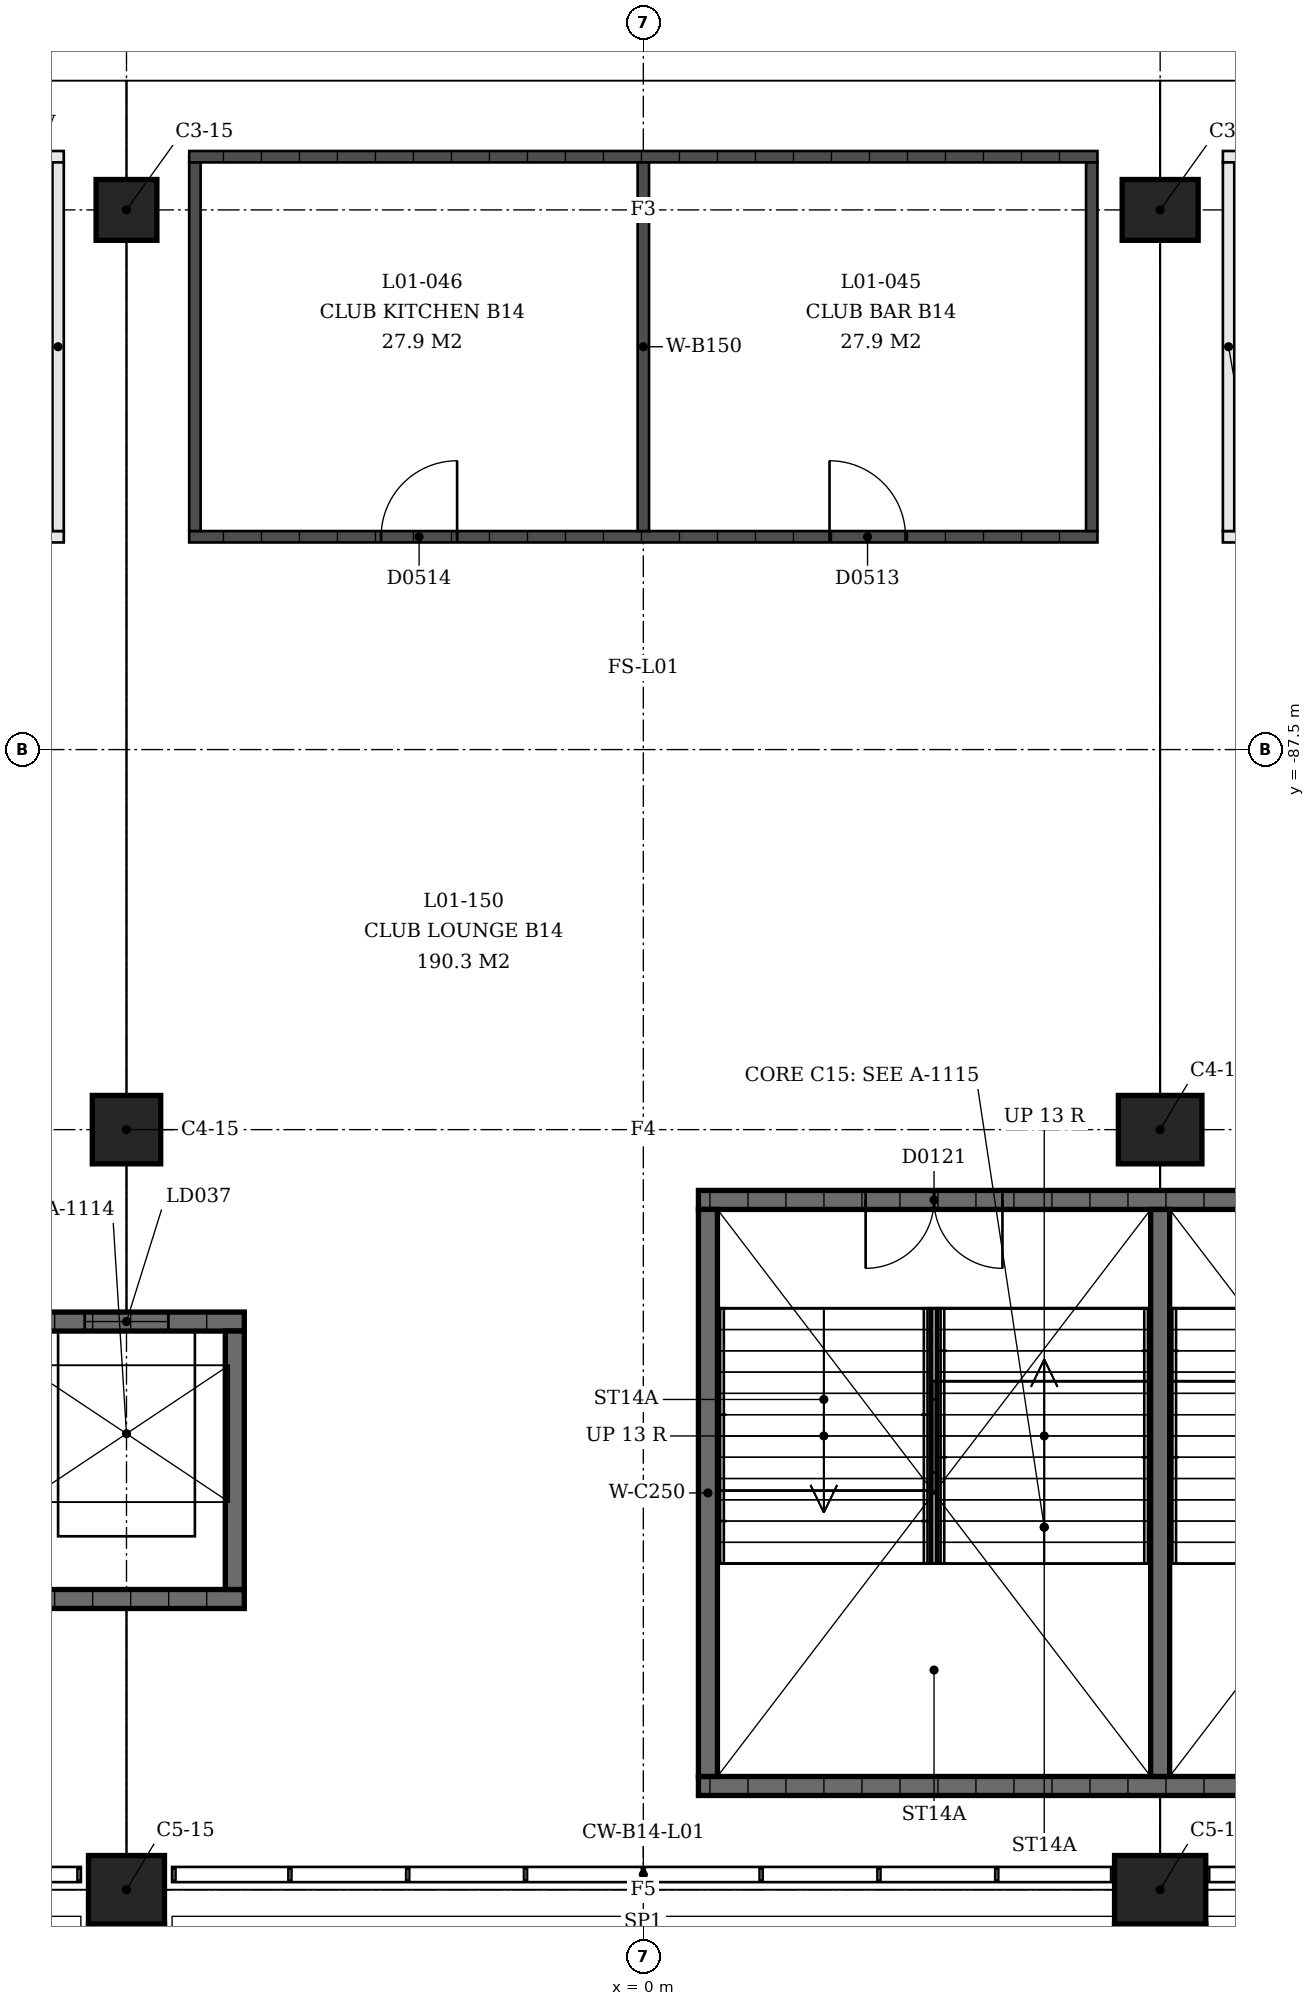
"""IFC4 building model, lengths in metres.
Left out: names, types, materials, properties, quantities, classifications, styles, units other than length and angle.
Written with IfcOpenShell. Run it as: python <this file> out.ifc"""

import sys

from ifc_helpers import new_model, si_unit, direction, frame, frame_2d, origin, origin_2d, place, context, subcontext, project, spatial, rectangle, extrude, element, fill, save


model = new_model("IFC4")
c1 = context("Model", 3, precision=1e-05, world=origin(), true_north=direction((0.0, 1.0)))
c2 = subcontext(c1, "Body", "Model", "MODEL_VIEW")
j1 = project(units=[si_unit("LENGTHUNIT", "METRE"), si_unit("PLANEANGLEUNIT", "RADIAN")], contexts=[c1])
p1 = place(None, origin())
s1 = spatial("IfcSite", under=j1, at=p1, CompositionType="ELEMENT")
p2 = place(p1, origin())
s2 = spatial("IfcBuilding", under=s1, at=p2, CompositionType="ELEMENT")
p3 = place(p2, frame((0.0, 0.0, 4.5)))
s3 = spatial("IfcBuildingStorey", under=s2, at=p3, CompositionType="ELEMENT", Elevation=4.5)
p4 = place(p3, frame((6.8, -80.4, 0.0), z_axis=(0.0, 0.0, 1.0), x_axis=(1.0, 0.0, 0.0)))
e1 = element("IfcColumn", 1, at=p4, inside=s3, PredefinedType="COLUMN", context=c2, shape_type="SweptSolid", body=[
    extrude(rectangle(XDim=1.0, YDim=0.8, at=origin_2d()), origin(), (0.0, 0.0, 1.0), 4.5),
])
p5 = place(p3, frame((6.8, -92.5, 0.0), z_axis=(0.0, 0.0, 1.0), x_axis=(1.0, 0.0, 0.0)))
e2 = element("IfcColumn", 2, at=p5, inside=s3, PredefinedType="COLUMN", context=c2, shape_type="SweptSolid", body=[
    extrude(rectangle(XDim=1.1, YDim=0.9, at=origin_2d()), origin(), (0.0, 0.0, 1.0), 4.5),
])
p6 = place(p3, frame((6.8, -102.5, 0.0), z_axis=(0.0, 0.0, 1.0), x_axis=(1.0, 0.0, 0.0)))
e3 = element("IfcColumn", 3, at=p6, inside=s3, PredefinedType="COLUMN", context=c2, shape_type="SweptSolid", body=[
    extrude(rectangle(XDim=1.2, YDim=0.9, at=origin_2d()), origin(), (0.0, 0.0, 1.0), 4.5),
])
p7 = place(p3, frame((-6.8, -80.4, 0.0), z_axis=(0.0, 0.0, 1.0), x_axis=(1.0, 0.0, 0.0)))
e4 = element("IfcColumn", 4, at=p7, inside=s3, PredefinedType="COLUMN", context=c2, shape_type="SweptSolid", body=[
    extrude(rectangle(XDim=0.8, YDim=0.8, at=origin_2d()), origin(), (0.0, 0.0, 1.0), 4.5),
])
p8 = place(p3, frame((-6.8, -92.5, 0.0), z_axis=(0.0, 0.0, 1.0), x_axis=(1.0, 0.0, 0.0)))
e5 = element("IfcColumn", 5, at=p8, inside=s3, PredefinedType="COLUMN", context=c2, shape_type="SweptSolid", body=[
    extrude(rectangle(XDim=0.9, YDim=0.9, at=origin_2d()), origin(), (0.0, 0.0, 1.0), 4.5),
])
p9 = place(p3, frame((-6.8, -102.5, 0.0), z_axis=(0.0, 0.0, 1.0), x_axis=(1.0, 0.0, 0.0)))
e6 = element("IfcColumn", 6, at=p9, inside=s3, PredefinedType="COLUMN", context=c2, shape_type="SweptSolid", body=[
    extrude(rectangle(XDim=1.0, YDim=0.9, at=origin_2d()), origin(), (0.0, 0.0, 1.0), 4.5),
])
p10 = place(p3, frame((0.725, -93.425, 0.0), z_axis=(0.0, 0.0, 1.0), x_axis=(1.0, 0.0, 0.0)))
e7 = element("IfcWall", 7, at=p10, inside=s3, PredefinedType="SHEAR", context=c2, shape_type="SweptSolid", body=[
    extrude(rectangle(XDim=12.15, YDim=0.25, at=frame_2d((6.075, 0.0))), origin(), (0.0, 0.0, 1.0), 4.09),
])
p11 = place(p10, frame((2.2, 0.0, 0.0)))
e8 = element("IfcOpeningElement", 8, at=p11, cuts=e7, PredefinedType="OPENING", context=c2, shape_type="SweptSolid", body=[
    extrude(rectangle(XDim=1.8, YDim=2.1, at=frame_2d((0.9, 1.05))), frame((0.0, 0.125, 0.0), z_axis=(0.0, -1.0, 0.0), x_axis=(1.0, 0.0, 0.0)), (0.0, 0.0, 1.0), 0.25),
])
p12 = place(p10, frame((8.15, 0.0, 0.0)))
e9 = element("IfcOpeningElement", 9, at=p12, cuts=e7, PredefinedType="OPENING", context=c2, shape_type="SweptSolid", body=[
    extrude(rectangle(XDim=1.8, YDim=2.1, at=frame_2d((0.9, 1.05))), frame((0.0, 0.125, 0.0), z_axis=(0.0, -1.0, 0.0), x_axis=(1.0, 0.0, 0.0)), (0.0, 0.0, 1.0), 0.25),
])
p13 = place(p3, frame((0.725, -101.135, 0.0), z_axis=(0.0, 0.0, 1.0), x_axis=(1.0, 0.0, 0.0)))
e10 = element("IfcWall", 10, at=p13, inside=s3, PredefinedType="SHEAR", context=c2, shape_type="SweptSolid", body=[
    extrude(rectangle(XDim=12.15, YDim=0.25, at=frame_2d((6.075, 0.0))), origin(), (0.0, 0.0, 1.0), 4.09),
])
for number, where, z_axis, x_axis in (
    (11, (0.85, -93.55, 0.0), (0.0, 0.0, 1.0), (0.0, -1.0, 0.0)),
    (12, (6.8, -93.55, 0.0), (0.0, 0.0, 1.0), (0.0, -1.0, 0.0)),
):
    element("IfcWall", number, at=place(p3, frame(where, z_axis=z_axis, x_axis=x_axis)), inside=s3, PredefinedType="SHEAR", context=c2, shape_type="SweptSolid", body=[
        extrude(rectangle(XDim=7.46, YDim=0.25, at=frame_2d((3.73, 0.0))), origin(), (0.0, 0.0, 1.0), 4.09),
    ])
p14 = place(p3, frame((-8.35, -95.025, 0.0), z_axis=(0.0, 0.0, 1.0), x_axis=(1.0, 0.0, 0.0)))
e13 = element("IfcWall", 13, at=p14, inside=s3, PredefinedType="SHEAR", context=c2, shape_type="SweptSolid", body=[
    extrude(rectangle(XDim=3.1, YDim=0.25, at=frame_2d((1.55, 0.0))), origin(), (0.0, 0.0, 1.0), 4.09),
])
p15 = place(p14, frame((1.0, 0.0, 0.0)))
e14 = element("IfcOpeningElement", 14, at=p15, cuts=e13, PredefinedType="OPENING", context=c2, shape_type="SweptSolid", body=[
    extrude(rectangle(XDim=1.1, YDim=2.1, at=frame_2d((0.55, 1.05))), frame((0.0, 0.125, 0.0), z_axis=(0.0, -1.0, 0.0), x_axis=(1.0, 0.0, 0.0)), (0.0, 0.0, 1.0), 0.25),
])
p16 = place(p3, frame((-8.35, -98.675, 0.0), z_axis=(0.0, 0.0, 1.0), x_axis=(1.0, 0.0, 0.0)))
e15 = element("IfcWall", 15, at=p16, inside=s3, PredefinedType="SHEAR", context=c2, shape_type="SweptSolid", body=[
    extrude(rectangle(XDim=3.1, YDim=0.25, at=frame_2d((1.55, 0.0))), origin(), (0.0, 0.0, 1.0), 4.09),
])
p17 = place(p3, frame((-5.375, -95.15, 0.0), z_axis=(0.0, 0.0, 1.0), x_axis=(0.0, -1.0, 0.0)))
e16 = element("IfcWall", 16, at=p17, inside=s3, PredefinedType="SHEAR", context=c2, shape_type="SweptSolid", body=[
    extrude(rectangle(XDim=3.4, YDim=0.25, at=frame_2d((1.7, 0.0))), origin(), (0.0, 0.0, 1.0), 4.09),
])
p18 = place(p3, frame((7.625, -79.7, 0.0), z_axis=(0.0, 0.0, 1.0), x_axis=(1.0, 0.0, 0.0)))
e17 = element("IfcWall", 17, at=p18, inside=s3, PredefinedType="PARTITIONING", context=c2, shape_type="SweptSolid", body=[
    extrude(rectangle(XDim=11.95, YDim=0.15, at=frame_2d((5.975, 0.0))), origin(), (0.0, 0.0, 1.0), 3.0),
])
p19 = place(p3, frame((7.625, -84.7, 0.0), z_axis=(0.0, 0.0, 1.0), x_axis=(1.0, 0.0, 0.0)))
e18 = element("IfcWall", 18, at=p19, inside=s3, PredefinedType="PARTITIONING", context=c2, shape_type="SweptSolid", body=[
    extrude(rectangle(XDim=11.95, YDim=0.15, at=frame_2d((5.975, 0.0))), origin(), (0.0, 0.0, 1.0), 3.0),
])
p20 = place(p19, frame((1.454, 0.0, 0.0)))
e19 = element("IfcOpeningElement", 19, at=p20, cuts=e18, PredefinedType="OPENING", context=c2, shape_type="SweptSolid", body=[
    extrude(rectangle(XDim=0.9, YDim=2.1, at=frame_2d((0.45, 1.05))), frame((0.0, 0.075, 0.0), z_axis=(0.0, -1.0, 0.0), x_axis=(1.0, 0.0, 0.0)), (0.0, 0.0, 1.0), 0.15),
])
p21 = place(p19, frame((5.112, 0.0, 0.0)))
e20 = element("IfcOpeningElement", 20, at=p21, cuts=e18, PredefinedType="OPENING", context=c2, shape_type="SweptSolid", body=[
    extrude(rectangle(XDim=0.9, YDim=2.1, at=frame_2d((0.45, 1.05))), frame((0.0, 0.075, 0.0), z_axis=(0.0, -1.0, 0.0), x_axis=(1.0, 0.0, 0.0)), (0.0, 0.0, 1.0), 0.15),
])
p22 = place(p19, frame((7.962, 0.0, 0.0)))
e21 = element("IfcOpeningElement", 21, at=p22, cuts=e18, PredefinedType="OPENING", context=c2, shape_type="SweptSolid", body=[
    extrude(rectangle(XDim=1.1, YDim=2.1, at=frame_2d((0.55, 1.05))), frame((0.0, 0.075, 0.0), z_axis=(0.0, -1.0, 0.0), x_axis=(1.0, 0.0, 0.0)), (0.0, 0.0, 1.0), 0.15),
])
p23 = place(p19, frame((10.204, 0.0, 0.0)))
e22 = element("IfcOpeningElement", 22, at=p23, cuts=e18, PredefinedType="OPENING", context=c2, shape_type="SweptSolid", body=[
    extrude(rectangle(XDim=1.1, YDim=2.1, at=frame_2d((0.55, 1.05))), frame((0.0, 0.075, 0.0), z_axis=(0.0, -1.0, 0.0), x_axis=(1.0, 0.0, 0.0)), (0.0, 0.0, 1.0), 0.15),
])
p24 = place(p3, frame((7.7, -79.775, 0.0), z_axis=(0.0, 0.0, 1.0), x_axis=(0.0, -1.0, 0.0)))
e23 = element("IfcWall", 23, at=p24, inside=s3, PredefinedType="PARTITIONING", context=c2, shape_type="SweptSolid", body=[
    extrude(rectangle(XDim=4.85, YDim=0.15, at=frame_2d((2.425, 0.0))), origin(), (0.0, 0.0, 1.0), 3.0),
])
p25 = place(p3, frame((5.975, -79.7, 0.0), z_axis=(0.0, 0.0, 1.0), x_axis=(-1.0, 0.0, 0.0)))
e24 = element("IfcWall", 24, at=p25, inside=s3, PredefinedType="SOLIDWALL", context=c2, shape_type="SweptSolid", body=[
    extrude(rectangle(XDim=11.95, YDim=0.15, at=frame_2d((5.975, 0.0))), origin(), (0.0, 0.0, 1.0), 3.0),
])
p26 = place(p3, frame((5.975, -84.7, 0.0), z_axis=(0.0, 0.0, 1.0), x_axis=(-1.0, 0.0, 0.0)))
e25 = element("IfcWall", 25, at=p26, inside=s3, PredefinedType="SOLIDWALL", context=c2, shape_type="SweptSolid", body=[
    extrude(rectangle(XDim=11.95, YDim=0.15, at=frame_2d((5.975, 0.0))), origin(), (0.0, 0.0, 1.0), 3.0),
])
p27 = place(p26, frame((2.525, 0.0, 0.0)))
e26 = element("IfcOpeningElement", 26, at=p27, cuts=e25, PredefinedType="OPENING", context=c2, shape_type="SweptSolid", body=[
    extrude(rectangle(XDim=1.0, YDim=2.1, at=frame_2d((0.5, 1.05))), frame((0.0, 0.075, 0.0), z_axis=(0.0, -1.0, 0.0), x_axis=(1.0, 0.0, 0.0)), (0.0, 0.0, 1.0), 0.15),
])
p28 = place(p26, frame((8.425, 0.0, 0.0)))
e27 = element("IfcOpeningElement", 27, at=p28, cuts=e25, PredefinedType="OPENING", context=c2, shape_type="SweptSolid", body=[
    extrude(rectangle(XDim=1.0, YDim=2.1, at=frame_2d((0.5, 1.05))), frame((0.0, 0.075, 0.0), z_axis=(0.0, -1.0, 0.0), x_axis=(1.0, 0.0, 0.0)), (0.0, 0.0, 1.0), 0.15),
])
for number, where, z_axis, x_axis in (
    (28, (5.9, -79.775, 0.0), (0.0, 0.0, 1.0), (0.0, -1.0, 0.0)),
    (29, (0.0, -79.775, 0.0), (0.0, 0.0, 1.0), (0.0, -1.0, 0.0)),
    (30, (-5.9, -79.775, 0.0), (0.0, 0.0, 1.0), (0.0, -1.0, 0.0)),
):
    element("IfcWall", number, at=place(p3, frame(where, z_axis=z_axis, x_axis=x_axis)), inside=s3, PredefinedType="SOLIDWALL", context=c2, shape_type="SweptSolid", body=[
        extrude(rectangle(XDim=4.85, YDim=0.15, at=frame_2d((2.425, 0.0))), origin(), (0.0, 0.0, 1.0), 3.0),
    ])
p29 = place(p3, frame((-19.575, -79.7, 0.0), z_axis=(0.0, 0.0, 1.0), x_axis=(1.0, 0.0, 0.0)))
e31 = element("IfcWall", 31, at=p29, inside=s3, PredefinedType="PARTITIONING", context=c2, shape_type="SweptSolid", body=[
    extrude(rectangle(XDim=11.95, YDim=0.15, at=frame_2d((5.975, 0.0))), origin(), (0.0, 0.0, 1.0), 3.0),
])
p30 = place(p3, frame((-19.575, -84.7, 0.0), z_axis=(0.0, 0.0, 1.0), x_axis=(1.0, 0.0, 0.0)))
e32 = element("IfcWall", 32, at=p30, inside=s3, PredefinedType="PARTITIONING", context=c2, shape_type="SweptSolid", body=[
    extrude(rectangle(XDim=11.95, YDim=0.15, at=frame_2d((5.975, 0.0))), origin(), (0.0, 0.0, 1.0), 3.0),
])
p31 = place(p30, frame((1.454, 0.0, 0.0)))
e33 = element("IfcOpeningElement", 33, at=p31, cuts=e32, PredefinedType="OPENING", context=c2, shape_type="SweptSolid", body=[
    extrude(rectangle(XDim=0.9, YDim=2.1, at=frame_2d((0.45, 1.05))), frame((0.0, 0.075, 0.0), z_axis=(0.0, -1.0, 0.0), x_axis=(1.0, 0.0, 0.0)), (0.0, 0.0, 1.0), 0.15),
])
p32 = place(p30, frame((5.112, 0.0, 0.0)))
e34 = element("IfcOpeningElement", 34, at=p32, cuts=e32, PredefinedType="OPENING", context=c2, shape_type="SweptSolid", body=[
    extrude(rectangle(XDim=0.9, YDim=2.1, at=frame_2d((0.45, 1.05))), frame((0.0, 0.075, 0.0), z_axis=(0.0, -1.0, 0.0), x_axis=(1.0, 0.0, 0.0)), (0.0, 0.0, 1.0), 0.15),
])
p33 = place(p30, frame((7.962, 0.0, 0.0)))
e35 = element("IfcOpeningElement", 35, at=p33, cuts=e32, PredefinedType="OPENING", context=c2, shape_type="SweptSolid", body=[
    extrude(rectangle(XDim=1.1, YDim=2.1, at=frame_2d((0.55, 1.05))), frame((0.0, 0.075, 0.0), z_axis=(0.0, -1.0, 0.0), x_axis=(1.0, 0.0, 0.0)), (0.0, 0.0, 1.0), 0.15),
])
p34 = place(p30, frame((10.204, 0.0, 0.0)))
e36 = element("IfcOpeningElement", 36, at=p34, cuts=e32, PredefinedType="OPENING", context=c2, shape_type="SweptSolid", body=[
    extrude(rectangle(XDim=1.1, YDim=2.1, at=frame_2d((0.55, 1.05))), frame((0.0, 0.075, 0.0), z_axis=(0.0, -1.0, 0.0), x_axis=(1.0, 0.0, 0.0)), (0.0, 0.0, 1.0), 0.15),
])
p35 = place(p3, frame((-7.7, -79.775, 0.0), z_axis=(0.0, 0.0, 1.0), x_axis=(0.0, -1.0, 0.0)))
e37 = element("IfcWall", 37, at=p35, inside=s3, PredefinedType="PARTITIONING", context=c2, shape_type="SweptSolid", body=[
    extrude(rectangle(XDim=4.85, YDim=0.15, at=frame_2d((2.425, 0.0))), origin(), (0.0, 0.0, 1.0), 3.0),
])
p36 = place(p11, origin())
e38 = element("IfcDoor", 38, at=p36, inside=s3, OperationType="DOUBLE_DOOR_SINGLE_SWING", PredefinedType="DOOR", context=c2, shape_type="SweptSolid", body=[
    extrude(rectangle(XDim=1.8, YDim=2.1, at=frame_2d((0.9, 1.05))), frame((0.0, 0.025, 0.0), z_axis=(0.0, -1.0, 0.0), x_axis=(1.0, 0.0, 0.0)), (0.0, 0.0, 1.0), 0.05),
])
fill(e8, e38)
p37 = place(p15, origin())
e39 = element("IfcDoor", 39, at=p37, inside=s3, OperationType="SLIDING_TO_LEFT", PredefinedType="DOOR", context=c2, shape_type="SweptSolid", body=[
    extrude(rectangle(XDim=1.1, YDim=2.1, at=frame_2d((0.55, 1.05))), frame((0.0, 0.025, 0.0), z_axis=(0.0, -1.0, 0.0), x_axis=(1.0, 0.0, 0.0)), (0.0, 0.0, 1.0), 0.05),
])
fill(e14, e39)
p38 = place(p27, origin())
e40 = element("IfcDoor", 40, at=p38, inside=s3, OperationType="SINGLE_SWING_RIGHT", PredefinedType="DOOR", context=c2, shape_type="SweptSolid", body=[
    extrude(rectangle(XDim=1.0, YDim=2.1, at=frame_2d((0.5, 1.05))), frame((0.0, 0.025, 0.0), z_axis=(0.0, -1.0, 0.0), x_axis=(1.0, 0.0, 0.0)), (0.0, 0.0, 1.0), 0.05),
])
fill(e26, e40)
p39 = place(p28, origin())
e41 = element("IfcDoor", 41, at=p39, inside=s3, OperationType="SINGLE_SWING_LEFT", PredefinedType="DOOR", context=c2, shape_type="SweptSolid", body=[
    extrude(rectangle(XDim=1.0, YDim=2.1, at=frame_2d((0.5, 1.05))), frame((0.0, 0.025, 0.0), z_axis=(0.0, -1.0, 0.0), x_axis=(1.0, 0.0, 0.0)), (0.0, 0.0, 1.0), 0.05),
])
fill(e27, e41)
save(model, sys.argv[1])
